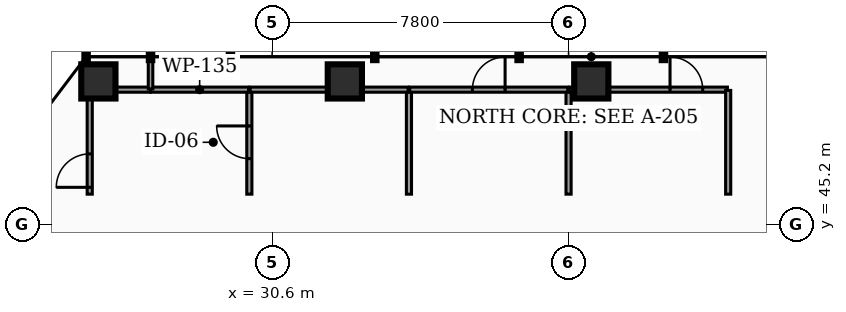
"""IFC4 building model, lengths in metres.
Left out: names, types, materials, properties, quantities, classifications, styles, units other than length and angle.
Written with IfcOpenShell. Run it as: python <this file> out.ifc"""

import sys

from ifc_helpers import new_model, si_unit, direction, frame, frame_2d, origin, origin_2d, place, context, subcontext, project, spatial, rectangle, hollow_rectangle, extrude, element, fill, save


model = new_model("IFC4")
c1 = context("Model", 3, precision=1e-05, world=origin(), true_north=direction((0.0, 1.0)))
c2 = subcontext(c1, "Body", "Model", "MODEL_VIEW")
j1 = project(units=[si_unit("LENGTHUNIT", "METRE"), si_unit("PLANEANGLEUNIT", "RADIAN")], contexts=[c1])
p1 = place(None, origin())
s1 = spatial("IfcSite", under=j1, at=p1, CompositionType="ELEMENT")
p2 = place(p1, origin())
s2 = spatial("IfcBuilding", under=s1, at=p2, CompositionType="ELEMENT")
p3 = place(p2, frame((0.0, 0.0, 84.66)))
s3 = spatial("IfcBuildingStorey", under=s2, at=p3, CompositionType="ELEMENT", Elevation=84.66)
for number, where, z_axis, x_axis in (
    (1, (38.998, 48.967, 0.0), (0.0, 0.0, 1.0), (1.0, 0.0, 0.0)),
    (2, (32.513, 48.967, 0.0), (0.0, 0.0, 1.0), (1.0, 0.0, 0.0)),
    (3, (26.028, 48.967, 0.0), (0.0, 0.0, 1.0), (1.0, 0.0, 0.0)),
):
    element("IfcColumn", number, at=place(p3, frame(where, z_axis=z_axis, x_axis=x_axis)), inside=s3, PredefinedType="COLUMN", context=c2, shape_type="SweptSolid", body=[
        extrude(hollow_rectangle(XDim=0.9, YDim=0.9, WallThickness=0.045, at=origin_2d()), origin(), (0.0, 0.0, 1.0), 3.82),
    ])
p4 = place(p3, frame((30.0, 46.0, 0.0), z_axis=(0.0, 0.0, 1.0), x_axis=(0.0, 1.0, 0.0)))
e4 = element("IfcWall", 4, at=p4, inside=s3, PredefinedType="PARTITIONING", context=c2, shape_type="SweptSolid", body=[
    extrude(rectangle(XDim=2.73, YDim=0.135, at=frame_2d((1.365, 0.0))), origin(), (0.0, 0.0, 1.0), 2.777),
])
p5 = place(p4, frame((0.935, 0.0, 0.0)))
e5 = element("IfcOpeningElement", 5, at=p5, cuts=e4, PredefinedType="OPENING", context=c2, shape_type="SweptSolid", body=[
    extrude(rectangle(XDim=0.86, YDim=2.05, at=frame_2d((0.43, 1.025))), frame((0.0, 0.077, 0.0), z_axis=(0.0, -1.0, 0.0), x_axis=(1.0, 0.0, 0.0)), (0.0, 0.0, 1.0), 0.155),
])
p6 = place(p3, frame((27.405, 48.75, 0.0), z_axis=(0.0, 0.0, 1.0), x_axis=(1.0, 0.0, 0.0)))
e6 = element("IfcWall", 6, at=p6, inside=s3, PredefinedType="PARTITIONING", context=c2, shape_type="SweptSolid", body=[
    extrude(rectangle(XDim=2.575, YDim=0.135, at=frame_2d((1.288, 0.0))), origin(), (0.0, 0.0, 1.0), 2.777),
])
p7 = place(p3, frame((25.8, 46.0, 0.0), z_axis=(0.0, 0.0, 1.0), x_axis=(0.0, 1.0, 0.0)))
e7 = element("IfcWall", 7, at=p7, inside=s3, PredefinedType="PARTITIONING", context=c2, shape_type="SweptSolid", body=[
    extrude(rectangle(XDim=2.584, YDim=0.135, at=frame_2d((1.292, 0.0))), origin(), (0.0, 0.0, 1.0), 2.777),
])
p8 = place(p7, frame((0.18, 0.0, 0.0)))
e8 = element("IfcOpeningElement", 8, at=p8, cuts=e7, PredefinedType="OPENING", context=c2, shape_type="SweptSolid", body=[
    extrude(rectangle(XDim=0.88, YDim=2.05, at=frame_2d((0.44, 1.025))), frame((0.0, 0.077, 0.0), z_axis=(0.0, -1.0, 0.0), x_axis=(1.0, 0.0, 0.0)), (0.0, 0.0, 1.0), 0.155),
])
p9 = place(p3, frame((25.966, 48.75, 0.0), z_axis=(0.0, 0.0, 1.0), x_axis=(1.0, 0.0, 0.0)))
e9 = element("IfcWall", 9, at=p9, inside=s3, PredefinedType="PARTITIONING", context=c2, shape_type="SweptSolid", body=[
    extrude(rectangle(XDim=1.429, YDim=0.135, at=frame_2d((0.715, 0.0))), origin(), (0.0, 0.0, 1.0), 2.777),
])
p10 = place(p3, frame((34.2, 46.0, 0.0), z_axis=(0.0, 0.0, 1.0), x_axis=(0.0, 1.0, 0.0)))
e10 = element("IfcWall", 10, at=p10, inside=s3, PredefinedType="PARTITIONING", context=c2, shape_type="SweptSolid", body=[
    extrude(rectangle(XDim=2.73, YDim=0.135, at=frame_2d((1.365, 0.0))), origin(), (0.0, 0.0, 1.0), 2.777),
])
p11 = place(p3, frame((30.02, 48.75, 0.0), z_axis=(0.0, 0.0, 1.0), x_axis=(1.0, 0.0, 0.0)))
e11 = element("IfcWall", 11, at=p11, inside=s3, PredefinedType="PARTITIONING", context=c2, shape_type="SweptSolid", body=[
    extrude(rectangle(XDim=4.16, YDim=0.135, at=frame_2d((2.08, 0.0))), origin(), (0.0, 0.0, 1.0), 2.777),
])
p12 = place(p3, frame((38.4, 46.0, 0.0), z_axis=(0.0, 0.0, 1.0), x_axis=(0.0, 1.0, 0.0)))
e12 = element("IfcWall", 12, at=p12, inside=s3, PredefinedType="PARTITIONING", context=c2, shape_type="SweptSolid", body=[
    extrude(rectangle(XDim=2.73, YDim=0.135, at=frame_2d((1.365, 0.0))), origin(), (0.0, 0.0, 1.0), 2.777),
])
p13 = place(p3, frame((34.22, 48.75, 0.0), z_axis=(0.0, 0.0, 1.0), x_axis=(1.0, 0.0, 0.0)))
e13 = element("IfcWall", 13, at=p13, inside=s3, PredefinedType="PARTITIONING", context=c2, shape_type="SweptSolid", body=[
    extrude(rectangle(XDim=4.16, YDim=0.135, at=frame_2d((2.08, 0.0))), origin(), (0.0, 0.0, 1.0), 2.777),
])
p14 = place(p13, frame((1.65, 0.0, 0.0)))
e14 = element("IfcOpeningElement", 14, at=p14, cuts=e13, PredefinedType="OPENING", context=c2, shape_type="SweptSolid", body=[
    extrude(rectangle(XDim=0.86, YDim=2.05, at=frame_2d((0.43, 1.025))), frame((0.0, 0.077, 0.0), z_axis=(0.0, -1.0, 0.0), x_axis=(1.0, 0.0, 0.0)), (0.0, 0.0, 1.0), 0.155),
])
p15 = place(p3, frame((38.42, 48.75, 0.0), z_axis=(0.0, 0.0, 1.0), x_axis=(1.0, 0.0, 0.0)))
e15 = element("IfcWall", 15, at=p15, inside=s3, PredefinedType="PARTITIONING", context=c2, shape_type="SweptSolid", body=[
    extrude(rectangle(XDim=4.16, YDim=0.135, at=frame_2d((2.08, 0.0))), origin(), (0.0, 0.0, 1.0), 2.777),
])
p16 = place(p15, frame((2.65, 0.0, 0.0)))
e16 = element("IfcOpeningElement", 16, at=p16, cuts=e15, PredefinedType="OPENING", context=c2, shape_type="SweptSolid", body=[
    extrude(rectangle(XDim=0.86, YDim=2.05, at=frame_2d((0.43, 1.025))), frame((0.0, 0.077, 0.0), z_axis=(0.0, -1.0, 0.0), x_axis=(1.0, 0.0, 0.0)), (0.0, 0.0, 1.0), 0.155),
])
p17 = place(p3, frame((42.6, 46.0, 0.0), z_axis=(0.0, 0.0, 1.0), x_axis=(0.0, 1.0, 0.0)))
e17 = element("IfcWall", 17, at=p17, inside=s3, PredefinedType="PARTITIONING", context=c2, shape_type="SweptSolid", body=[
    extrude(rectangle(XDim=2.73, YDim=0.135, at=frame_2d((1.365, 0.0))), origin(), (0.0, 0.0, 1.0), 2.777),
])
p18 = place(p3, frame((27.4, 48.77, 0.0), z_axis=(0.0, 0.0, 1.0), x_axis=(0.0, 1.0, 0.0)))
e18 = element("IfcWall", 18, at=p18, inside=s3, PredefinedType="PARTITIONING", context=c2, shape_type="SweptSolid", body=[
    extrude(rectangle(XDim=0.832, YDim=0.12, at=frame_2d((0.416, 0.0))), origin(), (0.0, 0.0, 1.0), 2.777),
])
p19 = place(p5, origin())
e19 = element("IfcDoor", 19, at=p19, inside=s3, OperationType="SINGLE_SWING_RIGHT", PredefinedType="DOOR", context=c2, shape_type="SweptSolid", body=[
    extrude(rectangle(XDim=0.86, YDim=2.05, at=frame_2d((0.43, 1.025))), frame((0.0, 0.025, 0.0), z_axis=(0.0, -1.0, 0.0), x_axis=(1.0, 0.0, 0.0)), (0.0, 0.0, 1.0), 0.05),
])
fill(e5, e19)
p20 = place(p8, origin())
e20 = element("IfcDoor", 20, at=p20, inside=s3, OperationType="SINGLE_SWING_LEFT", PredefinedType="DOOR", context=c2, shape_type="SweptSolid", body=[
    extrude(rectangle(XDim=0.88, YDim=2.05, at=frame_2d((0.44, 1.025))), frame((0.0, 0.025, 0.0), z_axis=(0.0, -1.0, 0.0), x_axis=(1.0, 0.0, 0.0)), (0.0, 0.0, 1.0), 0.05),
])
fill(e8, e20)
p21 = place(p14, origin())
e21 = element("IfcDoor", 21, at=p21, inside=s3, OperationType="SINGLE_SWING_RIGHT", PredefinedType="DOOR", context=c2, shape_type="SweptSolid", body=[
    extrude(rectangle(XDim=0.86, YDim=2.05, at=frame_2d((0.43, 1.025))), frame((0.0, 0.025, 0.0), z_axis=(0.0, -1.0, 0.0), x_axis=(1.0, 0.0, 0.0)), (0.0, 0.0, 1.0), 0.05),
])
fill(e14, e21)
p22 = place(p16, origin())
e22 = element("IfcDoor", 22, at=p22, inside=s3, OperationType="SINGLE_SWING_LEFT", PredefinedType="DOOR", context=c2, shape_type="SweptSolid", body=[
    extrude(rectangle(XDim=0.86, YDim=2.05, at=frame_2d((0.43, 1.025))), frame((0.0, 0.025, 0.0), z_axis=(0.0, -1.0, 0.0), x_axis=(1.0, 0.0, 0.0)), (0.0, 0.0, 1.0), 0.05),
])
fill(e16, e22)
save(model, sys.argv[1])
